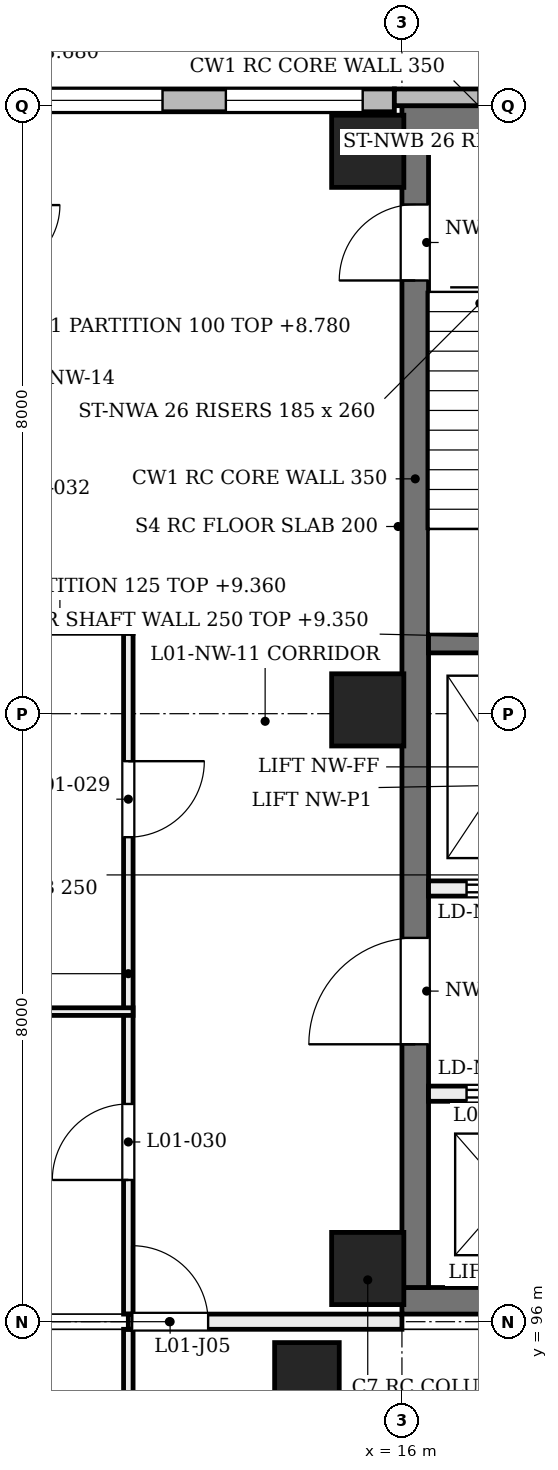
"""IFC4 building model, lengths in metres.
Left out: names, types, materials, properties, quantities, classifications, styles, units other than length and angle.
Written with IfcOpenShell. Run it as: python <this file> out.ifc"""

import sys

from ifc_helpers import new_model, si_unit, direction, frame, frame_2d, origin, origin_2d, place, context, subcontext, project, spatial, rectangle, extrude, element, fill, save


model = new_model("IFC4")
c1 = context("Model", 3, precision=1e-05, world=origin(), true_north=direction((0.0, 1.0)))
c2 = subcontext(c1, "Body", "Model", "MODEL_VIEW")
j1 = project(units=[si_unit("LENGTHUNIT", "METRE"), si_unit("PLANEANGLEUNIT", "RADIAN")], contexts=[c1])
p1 = place(None, origin())
s1 = spatial("IfcSite", under=j1, at=p1, CompositionType="ELEMENT")
p2 = place(p1, origin())
s2 = spatial("IfcBuilding", under=s1, at=p2, CompositionType="ELEMENT")
p3 = place(p2, frame((0.0, 0.0, 4.8)))
s3 = spatial("IfcBuildingStorey", under=s2, at=p3, CompositionType="ELEMENT", Elevation=4.8)
for number, where, z_axis, x_axis in (
    (1, (16.0, 96.275, 0.0), (0.0, 0.0, 1.0), (1.0, 0.0, 0.0)),
    (2, (16.0, 111.825, 0.0), (0.0, 0.0, 1.0), (1.0, 0.0, 0.0)),
):
    element("IfcWall", number, at=place(p3, frame(where, z_axis=z_axis, x_axis=x_axis)), inside=s3, PredefinedType="SHEAR", context=c2, shape_type="SweptSolid", body=[
        extrude(rectangle(XDim=7.9, YDim=0.35, at=frame_2d((3.95, 0.0))), origin(), (0.0, 0.0, 1.0), 4.58),
    ])
p4 = place(p3, frame((16.175, 96.45, 0.0), z_axis=(0.0, 0.0, 1.0), x_axis=(0.0, 1.0, 0.0)))
e3 = element("IfcWall", 3, at=p4, inside=s3, PredefinedType="SHEAR", context=c2, shape_type="SweptSolid", body=[
    extrude(rectangle(XDim=15.2, YDim=0.35, at=frame_2d((7.6, 0.0))), origin(), (0.0, 0.0, 1.0), 4.58),
])
p5 = place(p4, frame((13.25, 0.0, 0.0)))
e4 = element("IfcOpeningElement", 4, at=p5, cuts=e3, PredefinedType="OPENING", context=c2, shape_type="SweptSolid", body=[
    extrude(rectangle(XDim=1.0, YDim=2.1, at=frame_2d((0.5, 1.05))), frame((0.0, 0.185, 0.0), z_axis=(0.0, -1.0, 0.0), x_axis=(1.0, 0.0, 0.0)), (0.0, 0.0, 1.0), 0.37),
])
p6 = place(p4, frame((3.2, 0.0, 0.0)))
e5 = element("IfcOpeningElement", 5, at=p6, cuts=e3, PredefinedType="OPENING", context=c2, shape_type="SweptSolid", body=[
    extrude(rectangle(XDim=1.4, YDim=2.1, at=frame_2d((0.7, 1.05))), frame((0.0, 0.185, 0.0), z_axis=(0.0, -1.0, 0.0), x_axis=(1.0, 0.0, 0.0)), (0.0, 0.0, 1.0), 0.37),
])
for number, where, z_axis, x_axis in (
    (6, (15.55, 96.7, 0.0), (0.0, 0.0, 1.0), (1.0, 0.0, 0.0)),
    (7, (15.55, 104.05, 0.0), (0.0, 0.0, 1.0), (1.0, 0.0, 0.0)),
    (8, (15.55, 111.4, 0.0), (0.0, 0.0, 1.0), (1.0, 0.0, 0.0)),
):
    element("IfcColumn", number, at=place(p3, frame(where, z_axis=z_axis, x_axis=x_axis)), inside=s3, PredefinedType="COLUMN", context=c2, shape_type="SweptSolid", body=[
        extrude(rectangle(XDim=0.95, YDim=0.95, at=origin_2d()), origin(), (0.0, 0.0, 1.0), 4.8),
    ])
p7 = place(p3, frame((15.0, 95.3, 0.0), z_axis=(-0.203952265704, 0.0, 0.978980833987), x_axis=(0.0, -1.0, 0.0)))
e9 = element("IfcColumn", 9, at=p7, inside=s3, PredefinedType="COLUMN", context=c2, shape_type="SweptSolid", body=[
    extrude(rectangle(XDim=0.85, YDim=0.85, at=origin_2d()), origin(), (0.0, 0.0, 1.0), 4.903),
])
p8 = place(p3, frame((8.0, 112.07, 0.0), z_axis=(0.0, 0.0, 1.0), x_axis=(1.0, 0.0, 0.0)))
e10 = element("IfcWall", 10, at=p8, inside=s3, PredefinedType="SOLIDWALL", context=c2, shape_type="SweptSolid", body=[
    extrude(rectangle(XDim=7.9, YDim=0.3, at=frame_2d((3.95, 0.0))), origin(), (0.0, 0.0, 1.0), 3.9),
])
p9 = place(p8, frame((0.417, 0.0, 0.75)))
e11 = element("IfcOpeningElement", 11, at=p9, cuts=e10, PredefinedType="OPENING", context=c2, shape_type="SweptSolid", body=[
    extrude(rectangle(XDim=1.8, YDim=3.1, at=frame_2d((0.9, 1.55))), frame((0.0, 0.16, 0.0), z_axis=(0.0, -1.0, 0.0), x_axis=(1.0, 0.0, 0.0)), (0.0, 0.0, 1.0), 0.32),
])
p10 = place(p8, frame((3.05, 0.0, 0.75)))
e12 = element("IfcOpeningElement", 12, at=p10, cuts=e10, PredefinedType="OPENING", context=c2, shape_type="SweptSolid", body=[
    extrude(rectangle(XDim=1.8, YDim=3.1, at=frame_2d((0.9, 1.55))), frame((0.0, 0.16, 0.0), z_axis=(0.0, -1.0, 0.0), x_axis=(1.0, 0.0, 0.0)), (0.0, 0.0, 1.0), 0.32),
])
p11 = place(p8, frame((5.683, 0.0, 0.75)))
e13 = element("IfcOpeningElement", 13, at=p11, cuts=e10, PredefinedType="OPENING", context=c2, shape_type="SweptSolid", body=[
    extrude(rectangle(XDim=1.8, YDim=3.1, at=frame_2d((0.9, 1.55))), frame((0.0, 0.16, 0.0), z_axis=(0.0, -1.0, 0.0), x_axis=(1.0, 0.0, 0.0)), (0.0, 0.0, 1.0), 0.32),
])
p12 = place(p3, frame((15.9, 112.11, 0.0), z_axis=(0.0, 0.0, 1.0), x_axis=(1.0, 0.0, 0.0)))
e14 = element("IfcWall", 14, at=p12, inside=s3, PredefinedType="SOLIDWALL", context=c2, shape_type="SweptSolid", body=[
    extrude(rectangle(XDim=8.2, YDim=0.22, at=frame_2d((4.1, 0.0))), origin(), (0.0, 0.0, 1.0), 3.9),
])
p13 = place(p12, frame((1.108, 0.0, 0.9)))
e15 = element("IfcOpeningElement", 15, at=p13, cuts=e14, PredefinedType="OPENING", context=c2, shape_type="SweptSolid", body=[
    extrude(rectangle(XDim=0.45, YDim=2.6, at=frame_2d((0.225, 1.3))), frame((0.0, 0.12, 0.0), z_axis=(0.0, -1.0, 0.0), x_axis=(1.0, 0.0, 0.0)), (0.0, 0.0, 1.0), 0.24),
])
p14 = place(p12, frame((3.775, 0.0, 0.9)))
e16 = element("IfcOpeningElement", 16, at=p14, cuts=e14, PredefinedType="OPENING", context=c2, shape_type="SweptSolid", body=[
    extrude(rectangle(XDim=0.45, YDim=2.6, at=frame_2d((0.225, 1.3))), frame((0.0, 0.12, 0.0), z_axis=(0.0, -1.0, 0.0), x_axis=(1.0, 0.0, 0.0)), (0.0, 0.0, 1.0), 0.24),
])
p15 = place(p12, frame((6.442, 0.0, 0.9)))
e17 = element("IfcOpeningElement", 17, at=p15, cuts=e14, PredefinedType="OPENING", context=c2, shape_type="SweptSolid", body=[
    extrude(rectangle(XDim=0.45, YDim=2.6, at=frame_2d((0.225, 1.3))), frame((0.0, 0.12, 0.0), z_axis=(0.0, -1.0, 0.0), x_axis=(1.0, 0.0, 0.0)), (0.0, 0.0, 1.0), 0.24),
])
p16 = place(p3, frame((16.35, 104.925, 0.0), z_axis=(0.0, 0.0, 1.0), x_axis=(1.0, 0.0, 0.0)))
e18 = element("IfcWall", 18, at=p16, inside=s3, PredefinedType="SOLIDWALL", context=c2, shape_type="SweptSolid", body=[
    extrude(rectangle(XDim=3.1, YDim=0.25, at=frame_2d((1.55, 0.0))), origin(), (0.0, 0.0, 1.0), 4.55),
])
p17 = place(p3, frame((16.35, 101.7, 0.0), z_axis=(0.0, 0.0, 1.0), x_axis=(1.0, 0.0, 0.0)))
e19 = element("IfcWall", 19, at=p17, inside=s3, PredefinedType="SOLIDWALL", context=c2, shape_type="SweptSolid", body=[
    extrude(rectangle(XDim=7.2, YDim=0.2, at=frame_2d((3.6, 0.0))), origin(), (0.0, 0.0, 1.0), 4.55),
])
p18 = place(p17, frame((0.5, 0.0, 0.0)))
e20 = element("IfcOpeningElement", 20, at=p18, cuts=e19, PredefinedType="OPENING", context=c2, shape_type="SweptSolid", body=[
    extrude(rectangle(XDim=1.1, YDim=2.1, at=frame_2d((0.55, 1.05))), frame((0.0, 0.11, 0.0), z_axis=(0.0, -1.0, 0.0), x_axis=(1.0, 0.0, 0.0)), (0.0, 0.0, 1.0), 0.22),
])
p19 = place(p17, frame((5.6, 0.0, 0.0)))
e21 = element("IfcOpeningElement", 21, at=p19, cuts=e19, PredefinedType="OPENING", context=c2, shape_type="SweptSolid", body=[
    extrude(rectangle(XDim=1.1, YDim=2.1, at=frame_2d((0.55, 1.05))), frame((0.0, 0.11, 0.0), z_axis=(0.0, -1.0, 0.0), x_axis=(1.0, 0.0, 0.0)), (0.0, 0.0, 1.0), 0.22),
])
p20 = place(p17, frame((3.1, 0.0, 0.0)))
e22 = element("IfcOpeningElement", 22, at=p20, cuts=e19, PredefinedType="OPENING", context=c2, shape_type="SweptSolid", body=[
    extrude(rectangle(XDim=1.0, YDim=2.1, at=frame_2d((0.5, 1.05))), frame((0.0, 0.11, 0.0), z_axis=(0.0, -1.0, 0.0), x_axis=(1.0, 0.0, 0.0)), (0.0, 0.0, 1.0), 0.22),
])
p21 = place(p3, frame((16.35, 99.0, 0.0), z_axis=(0.0, 0.0, 1.0), x_axis=(1.0, 0.0, 0.0)))
e23 = element("IfcWall", 23, at=p21, inside=s3, PredefinedType="SOLIDWALL", context=c2, shape_type="SweptSolid", body=[
    extrude(rectangle(XDim=7.2, YDim=0.2, at=frame_2d((3.6, 0.0))), origin(), (0.0, 0.0, 1.0), 4.55),
])
p22 = place(p21, frame((0.5, 0.0, 0.0)))
e24 = element("IfcOpeningElement", 24, at=p22, cuts=e23, PredefinedType="OPENING", context=c2, shape_type="SweptSolid", body=[
    extrude(rectangle(XDim=1.1, YDim=2.1, at=frame_2d((0.55, 1.05))), frame((0.0, 0.11, 0.0), z_axis=(0.0, -1.0, 0.0), x_axis=(1.0, 0.0, 0.0)), (0.0, 0.0, 1.0), 0.22),
])
p23 = place(p21, frame((5.6, 0.0, 0.0)))
e25 = element("IfcOpeningElement", 25, at=p23, cuts=e23, PredefinedType="OPENING", context=c2, shape_type="SweptSolid", body=[
    extrude(rectangle(XDim=1.1, YDim=2.1, at=frame_2d((0.55, 1.05))), frame((0.0, 0.11, 0.0), z_axis=(0.0, -1.0, 0.0), x_axis=(1.0, 0.0, 0.0)), (0.0, 0.0, 1.0), 0.22),
])
p24 = place(p21, frame((3.1, 0.0, 0.0)))
e26 = element("IfcOpeningElement", 26, at=p24, cuts=e23, PredefinedType="OPENING", context=c2, shape_type="SweptSolid", body=[
    extrude(rectangle(XDim=1.0, YDim=2.1, at=frame_2d((0.5, 1.05))), frame((0.0, 0.11, 0.0), z_axis=(0.0, -1.0, 0.0), x_axis=(1.0, 0.0, 0.0)), (0.0, 0.0, 1.0), 0.22),
])
p25 = place(p3, frame((12.4, 91.805, 0.0), z_axis=(0.0, 0.0, 1.0), x_axis=(0.0, 1.0, 0.0)))
e27 = element("IfcWall", 27, at=p25, inside=s3, PredefinedType="PARTITIONING", context=c2, shape_type="SweptSolid", body=[
    extrude(rectangle(XDim=4.095, YDim=0.125, at=frame_2d((2.047, 0.0))), origin(), (0.0, 0.0, 1.0), 3.88),
])
p26 = place(p25, frame((1.82, 0.0, 0.0)))
e28 = element("IfcOpeningElement", 28, at=p26, cuts=e27, PredefinedType="OPENING", context=c2, shape_type="SweptSolid", body=[
    extrude(rectangle(XDim=1.0, YDim=2.1, at=frame_2d((0.5, 1.05))), frame((0.0, 0.073, 0.0), z_axis=(0.0, -1.0, 0.0), x_axis=(1.0, 0.0, 0.0)), (0.0, 0.0, 1.0), 0.145),
])
p27 = place(p3, frame((12.4, 96.1, 0.0), z_axis=(0.0, 0.0, 1.0), x_axis=(0.0, 1.0, 0.0)))
e29 = element("IfcWall", 29, at=p27, inside=s3, PredefinedType="PARTITIONING", context=c2, shape_type="SweptSolid", body=[
    extrude(rectangle(XDim=8.958, YDim=0.125, at=frame_2d((4.479, 0.0))), origin(), (0.0, 0.0, 1.0), 3.88),
])
p28 = place(p27, frame((6.275, 0.0, 0.0)))
e30 = element("IfcOpeningElement", 30, at=p28, cuts=e29, PredefinedType="OPENING", context=c2, shape_type="SweptSolid", body=[
    extrude(rectangle(XDim=1.0, YDim=2.1, at=frame_2d((0.5, 1.05))), frame((0.0, 0.073, 0.0), z_axis=(0.0, -1.0, 0.0), x_axis=(1.0, 0.0, 0.0)), (0.0, 0.0, 1.0), 0.145),
])
p29 = place(p27, frame((1.765, 0.0, 0.0)))
e31 = element("IfcOpeningElement", 31, at=p29, cuts=e29, PredefinedType="OPENING", context=c2, shape_type="SweptSolid", body=[
    extrude(rectangle(XDim=1.0, YDim=2.1, at=frame_2d((0.5, 1.05))), frame((0.0, 0.073, 0.0), z_axis=(0.0, -1.0, 0.0), x_axis=(1.0, 0.0, 0.0)), (0.0, 0.0, 1.0), 0.145),
])
p30 = place(p3, frame((8.3, 100.08, 0.0), z_axis=(0.0, 0.0, 1.0), x_axis=(1.0, 0.0, 0.0)))
e32 = element("IfcWall", 32, at=p30, inside=s3, PredefinedType="PARTITIONING", context=c2, shape_type="SweptSolid", body=[
    extrude(rectangle(XDim=4.162, YDim=0.1, at=frame_2d((2.081, 0.0))), origin(), (0.0, 0.0, 1.0), 3.98),
])
p31 = place(p3, frame((10.538, 105.12, 0.0), z_axis=(0.0, 0.0, 1.0), x_axis=(1.0, 0.0, 0.0)))
e33 = element("IfcWall", 33, at=p31, inside=s3, PredefinedType="PARTITIONING", context=c2, shape_type="SweptSolid", body=[
    extrude(rectangle(XDim=1.925, YDim=0.125, at=frame_2d((0.962, 0.0))), origin(), (0.0, 0.0, 1.0), 4.56),
])
p32 = place(p3, frame((12.4, 96.0, 0.0), z_axis=(0.0, 0.0, 1.0), x_axis=(1.0, 0.0, 0.0)))
e34 = element("IfcWall", 34, at=p32, inside=s3, PredefinedType="PARTITIONING", context=c2, shape_type="SweptSolid", body=[
    extrude(rectangle(XDim=3.6, YDim=0.2, at=frame_2d((1.8, 0.0))), origin(), (0.0, 0.0, 1.0), 3.88),
])
p33 = place(p32, frame((0.05, 0.0, 0.0)))
e35 = element("IfcOpeningElement", 35, at=p33, cuts=e34, PredefinedType="OPENING", context=c2, shape_type="SweptSolid", body=[
    extrude(rectangle(XDim=1.0, YDim=2.1, at=frame_2d((0.5, 1.05))), frame((0.0, 0.11, 0.0), z_axis=(0.0, -1.0, 0.0), x_axis=(1.0, 0.0, 0.0)), (0.0, 0.0, 1.0), 0.22),
])
p34 = place(p10, origin())
e36 = element("IfcWindow", 36, at=p34, inside=s3, PartitioningType="SINGLE_PANEL", PredefinedType="WINDOW", context=c2, shape_type="SweptSolid", body=[
    extrude(rectangle(XDim=1.8, YDim=3.1, at=frame_2d((0.9, 1.55))), frame((0.0, 0.03, 0.0), z_axis=(0.0, -1.0, 0.0), x_axis=(1.0, 0.0, 0.0)), (0.0, 0.0, 1.0), 0.06),
])
fill(e12, e36)
p35 = place(p11, origin())
e37 = element("IfcWindow", 37, at=p35, inside=s3, PartitioningType="SINGLE_PANEL", PredefinedType="WINDOW", context=c2, shape_type="SweptSolid", body=[
    extrude(rectangle(XDim=1.8, YDim=3.1, at=frame_2d((0.9, 1.55))), frame((0.0, 0.03, 0.0), z_axis=(0.0, -1.0, 0.0), x_axis=(1.0, 0.0, 0.0)), (0.0, 0.0, 1.0), 0.06),
])
fill(e13, e37)
p36 = place(p5, origin())
e38 = element("IfcDoor", 38, at=p36, inside=s3, OperationType="SINGLE_SWING_LEFT", PredefinedType="DOOR", context=c2, shape_type="SweptSolid", body=[
    extrude(rectangle(XDim=1.0, YDim=2.1, at=frame_2d((0.5, 1.05))), frame((0.0, 0.025, 0.0), z_axis=(0.0, -1.0, 0.0), x_axis=(1.0, 0.0, 0.0)), (0.0, 0.0, 1.0), 0.05),
])
fill(e4, e38)
p37 = place(p18, frame((1.1, 0.0, 0.0), z_axis=(0.0, 0.0, 1.0), x_axis=(-1.0, 0.0, 0.0)))
e39 = element("IfcDoor", 39, at=p37, inside=s3, OperationType="DOUBLE_DOOR_SLIDING", PredefinedType="DOOR", context=c2, shape_type="SweptSolid", body=[
    extrude(rectangle(XDim=1.1, YDim=2.1, at=frame_2d((0.55, 1.05))), frame((0.0, 0.025, 0.0), z_axis=(0.0, -1.0, 0.0), x_axis=(1.0, 0.0, 0.0)), (0.0, 0.0, 1.0), 0.05),
])
fill(e20, e39)
p38 = place(p22, origin())
e40 = element("IfcDoor", 40, at=p38, inside=s3, OperationType="DOUBLE_DOOR_SLIDING", PredefinedType="DOOR", context=c2, shape_type="SweptSolid", body=[
    extrude(rectangle(XDim=1.1, YDim=2.1, at=frame_2d((0.55, 1.05))), frame((0.0, 0.025, 0.0), z_axis=(0.0, -1.0, 0.0), x_axis=(1.0, 0.0, 0.0)), (0.0, 0.0, 1.0), 0.05),
])
fill(e24, e40)
p39 = place(p6, origin())
e41 = element("IfcDoor", 41, at=p39, inside=s3, OperationType="SINGLE_SWING_LEFT", PredefinedType="DOOR", context=c2, shape_type="SweptSolid", body=[
    extrude(rectangle(XDim=1.4, YDim=2.1, at=frame_2d((0.7, 1.05))), frame((0.0, 0.025, 0.0), z_axis=(0.0, -1.0, 0.0), x_axis=(1.0, 0.0, 0.0)), (0.0, 0.0, 1.0), 0.05),
])
fill(e5, e41)
p40 = place(p28, origin())
e42 = element("IfcDoor", 42, at=p40, inside=s3, OperationType="SINGLE_SWING_RIGHT", PredefinedType="DOOR", context=c2, shape_type="SweptSolid", body=[
    extrude(rectangle(XDim=1.0, YDim=2.1, at=frame_2d((0.5, 1.05))), frame((0.0, 0.025, 0.0), z_axis=(0.0, -1.0, 0.0), x_axis=(1.0, 0.0, 0.0)), (0.0, 0.0, 1.0), 0.05),
])
fill(e30, e42)
p41 = place(p29, origin())
e43 = element("IfcDoor", 43, at=p41, inside=s3, OperationType="SINGLE_SWING_LEFT", PredefinedType="DOOR", context=c2, shape_type="SweptSolid", body=[
    extrude(rectangle(XDim=1.0, YDim=2.1, at=frame_2d((0.5, 1.05))), frame((0.0, 0.025, 0.0), z_axis=(0.0, -1.0, 0.0), x_axis=(1.0, 0.0, 0.0)), (0.0, 0.0, 1.0), 0.05),
])
fill(e31, e43)
p42 = place(p33, origin())
e44 = element("IfcDoor", 44, at=p42, inside=s3, OperationType="SINGLE_SWING_LEFT", PredefinedType="DOOR", context=c2, shape_type="SweptSolid", body=[
    extrude(rectangle(XDim=1.0, YDim=2.1, at=frame_2d((0.5, 1.05))), frame((0.0, 0.025, 0.0), z_axis=(0.0, -1.0, 0.0), x_axis=(1.0, 0.0, 0.0)), (0.0, 0.0, 1.0), 0.05),
])
fill(e35, e44)
save(model, sys.argv[1])
